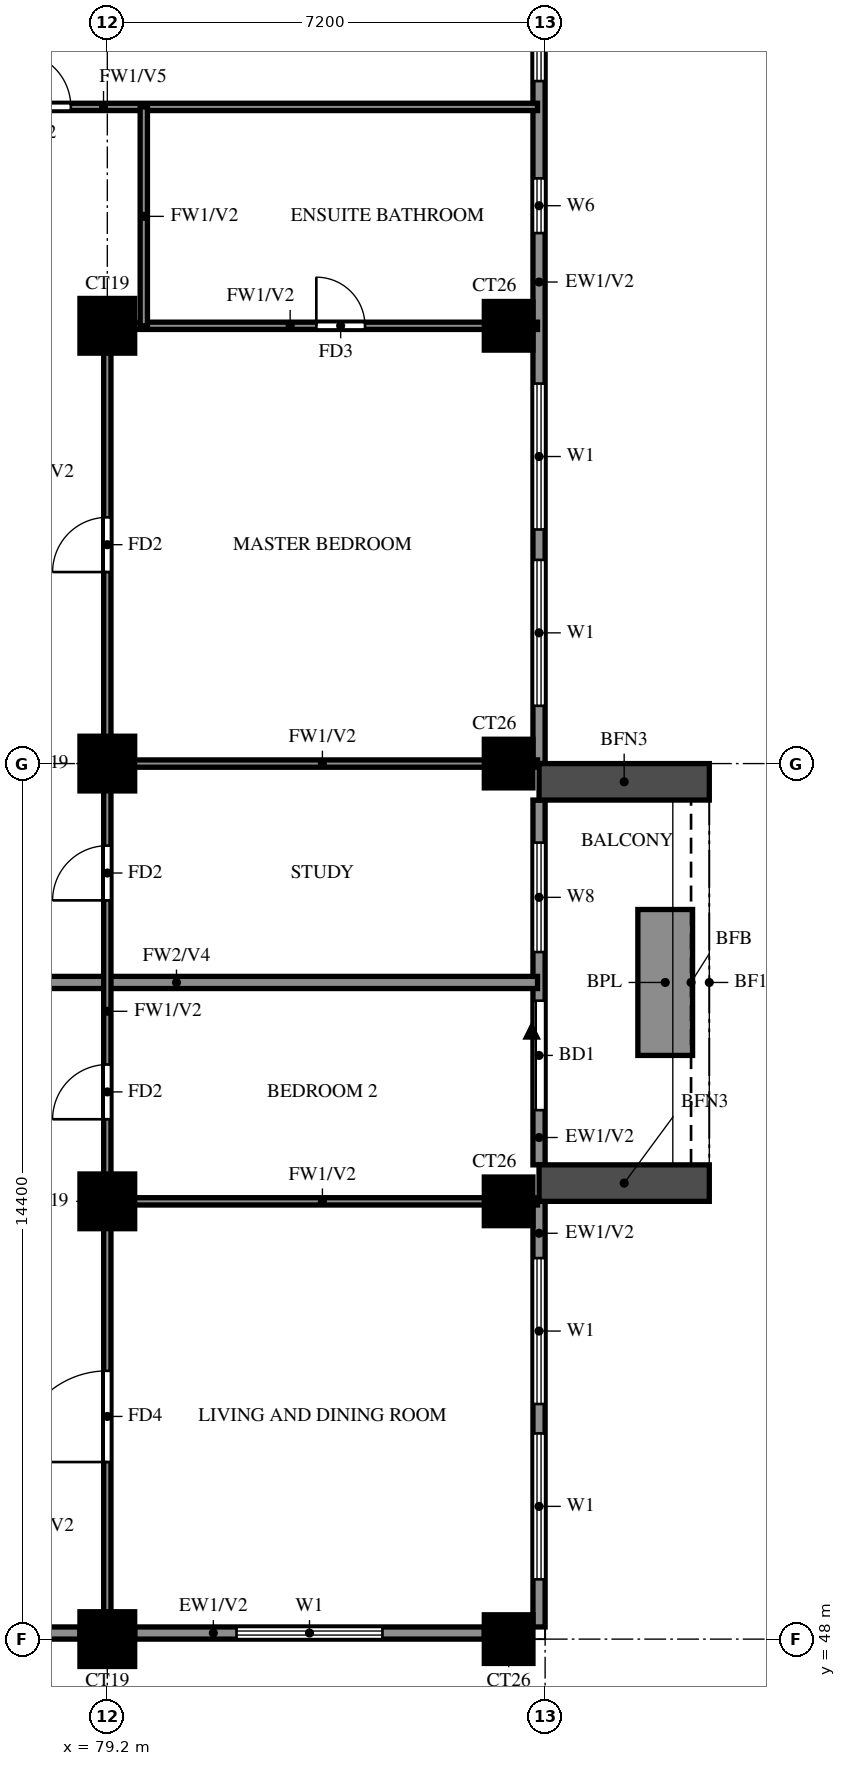
"""IFC4 building model, lengths in metres.
Left out: names, types, materials, properties, quantities, classifications, styles, units other than length and angle.
Written with IfcOpenShell. Run it as: python <this file> out.ifc"""

import sys

from ifc_helpers import new_model, si_unit, direction, frame, frame_2d, origin, origin_2d, place, context, subcontext, project, spatial, rectangle, extrude, source, transform, mapped, element, fill, save


model = new_model("IFC4")
c1 = context("Model", 3, precision=1e-05, world=origin(), true_north=direction((0.0, 1.0)))
c2 = subcontext(c1, "Body", "Model", "MODEL_VIEW")
j1 = project(units=[si_unit("LENGTHUNIT", "METRE"), si_unit("PLANEANGLEUNIT", "RADIAN")], contexts=[c1])
p1 = place(None, origin())
s1 = spatial("IfcSite", under=j1, at=p1, CompositionType="ELEMENT")
p2 = place(p1, origin())
s2 = spatial("IfcBuilding", under=s1, at=p2, CompositionType="ELEMENT")
p3 = place(p2, frame((0.0, 0.0, 181.5)))
s3 = spatial("IfcBuildingStorey", under=s2, at=p3, CompositionType="ELEMENT", Elevation=181.5)
m1 = source(origin(), c2, "Body", "SweptSolid", [
    extrude(rectangle(XDim=0.9, YDim=0.9, at=origin_2d()), origin(), (0.0, 0.0, 1.0), 3.2),
])
p4 = place(p3, frame((79.2, 48.0, 0.0), z_axis=(0.0, 0.0, 1.0), x_axis=(1.0, 0.0, 0.0)))
e1 = element("IfcColumn", 1, at=p4, inside=s3, PredefinedType="COLUMN", context=c2, shape_type="MappedRepresentation", body=[
    mapped(m1, transform((0.0, 0.0, 0.0))),
])
m2 = source(origin(), c2, "Body", "SweptSolid", [
    extrude(rectangle(XDim=0.8, YDim=0.8, at=origin_2d()), origin(), (0.0, 0.0, 1.0), 3.2),
])
p5 = place(p3, frame((85.8, 48.0, 0.0), z_axis=(0.0, 0.0, 1.0), x_axis=(1.0, 0.0, 0.0)))
e2 = element("IfcColumn", 2, at=p5, inside=s3, PredefinedType="COLUMN", context=c2, shape_type="MappedRepresentation", body=[
    mapped(m2, transform((0.0, 0.0, 0.0))),
])
p6 = place(p3, frame((79.2, 55.2, 0.0), z_axis=(0.0, 0.0, 1.0), x_axis=(1.0, 0.0, 0.0)))
e3 = element("IfcColumn", 3, at=p6, inside=s3, PredefinedType="COLUMN", context=c2, shape_type="MappedRepresentation", body=[
    mapped(m1, transform((0.0, 0.0, 0.0))),
])
p7 = place(p3, frame((85.8, 55.2, 0.0), z_axis=(0.0, 0.0, 1.0), x_axis=(1.0, 0.0, 0.0)))
e4 = element("IfcColumn", 4, at=p7, inside=s3, PredefinedType="COLUMN", context=c2, shape_type="MappedRepresentation", body=[
    mapped(m2, transform((0.0, 0.0, 0.0))),
])
p8 = place(p3, frame((79.2, 62.4, 0.0), z_axis=(0.0, 0.0, 1.0), x_axis=(1.0, 0.0, 0.0)))
e5 = element("IfcColumn", 5, at=p8, inside=s3, PredefinedType="COLUMN", context=c2, shape_type="MappedRepresentation", body=[
    mapped(m1, transform((0.0, 0.0, 0.0))),
])
p9 = place(p3, frame((85.8, 62.4, 0.0), z_axis=(0.0, 0.0, 1.0), x_axis=(1.0, 0.0, 0.0)))
e6 = element("IfcColumn", 6, at=p9, inside=s3, PredefinedType="COLUMN", context=c2, shape_type="MappedRepresentation", body=[
    mapped(m2, transform((0.0, 0.0, 0.0))),
])
p10 = place(p3, frame((79.2, 69.6, 0.0), z_axis=(0.0, 0.0, 1.0), x_axis=(1.0, 0.0, 0.0)))
e7 = element("IfcColumn", 7, at=p10, inside=s3, PredefinedType="COLUMN", context=c2, shape_type="MappedRepresentation", body=[
    mapped(m1, transform((0.0, 0.0, 0.0))),
])
p11 = place(p3, frame((85.8, 69.6, 0.0), z_axis=(0.0, 0.0, 1.0), x_axis=(1.0, 0.0, 0.0)))
e8 = element("IfcColumn", 8, at=p11, inside=s3, PredefinedType="COLUMN", context=c2, shape_type="MappedRepresentation", body=[
    mapped(m2, transform((0.0, 0.0, 0.0))),
])
p12 = place(p3, frame((85.719, 39.881, 0.0), z_axis=(0.0, 0.0, 1.0), x_axis=(-0.86377618652, 0.503875678716, 0.0)))
e9 = element("IfcWall", 9, at=p12, inside=s3, PredefinedType="SOLIDWALL", context=c2, shape_type="SweptSolid", body=[
    extrude(rectangle(XDim=16.311, YDim=0.2, at=frame_2d((8.156, 0.0))), origin(), (0.0, 0.0, 1.0), 3.2),
])
p13 = place(p12, frame((13.326, 0.0, 1.5)))
e10 = element("IfcOpeningElement", 10, at=p13, cuts=e9, PredefinedType="OPENING", context=c2, shape_type="SweptSolid", body=[
    extrude(rectangle(XDim=0.9, YDim=0.9, at=frame_2d((0.45, 0.45))), frame((0.0, 0.11, 0.0), z_axis=(0.0, -1.0, 0.0), x_axis=(1.0, 0.0, 0.0)), (0.0, 0.0, 1.0), 0.22),
])
p14 = place(p3, frame((71.99, 48.1, 0.0), z_axis=(0.0, 0.0, 1.0), x_axis=(1.0, 0.0, 0.0)))
e11 = element("IfcWall", 11, at=p14, inside=s3, PredefinedType="SOLIDWALL", context=c2, shape_type="SweptSolid", body=[
    extrude(rectangle(XDim=6.76, YDim=0.2, at=frame_2d((3.38, 0.0))), origin(), (0.0, 0.0, 1.0), 3.2),
])
p15 = place(p14, frame((2.205, 0.0, 1.5)))
e12 = element("IfcOpeningElement", 12, at=p15, cuts=e11, PredefinedType="OPENING", context=c2, shape_type="SweptSolid", body=[
    extrude(rectangle(XDim=0.9, YDim=0.9, at=frame_2d((0.45, 0.45))), frame((0.0, 0.11, 0.0), z_axis=(0.0, -1.0, 0.0), x_axis=(1.0, 0.0, 0.0)), (0.0, 0.0, 1.0), 0.22),
])
p16 = place(p3, frame((79.65, 48.1, 0.0), z_axis=(0.0, 0.0, 1.0), x_axis=(1.0, 0.0, 0.0)))
e13 = element("IfcWall", 13, at=p16, inside=s3, PredefinedType="SOLIDWALL", context=c2, shape_type="SweptSolid", body=[
    extrude(rectangle(XDim=5.75, YDim=0.2, at=frame_2d((2.875, 0.0))), origin(), (0.0, 0.0, 1.0), 3.2),
])
p17 = place(p16, frame((1.675, 0.0, 0.6)))
e14 = element("IfcOpeningElement", 14, at=p17, cuts=e13, PredefinedType="OPENING", context=c2, shape_type="SweptSolid", body=[
    extrude(rectangle(XDim=2.4, YDim=2.4, at=frame_2d((1.2, 1.2))), frame((0.0, 0.11, 0.0), z_axis=(0.0, -1.0, 0.0), x_axis=(1.0, 0.0, 0.0)), (0.0, 0.0, 1.0), 0.22),
])
p18 = place(p3, frame((86.3, 48.2, 0.0), z_axis=(0.0, 0.0, 1.0), x_axis=(0.0, 1.0, 0.0)))
e15 = element("IfcWall", 15, at=p18, inside=s3, PredefinedType="SOLIDWALL", context=c2, shape_type="SweptSolid", body=[
    extrude(rectangle(XDim=7.0, YDim=0.2, at=frame_2d((3.5, 0.0))), origin(), (0.0, 0.0, 1.0), 3.2),
])
p19 = place(p18, frame((0.783, 0.0, 0.6)))
e16 = element("IfcOpeningElement", 16, at=p19, cuts=e15, PredefinedType="OPENING", context=c2, shape_type="SweptSolid", body=[
    extrude(rectangle(XDim=2.4, YDim=2.4, at=frame_2d((1.2, 1.2))), frame((0.0, 0.11, 0.0), z_axis=(0.0, -1.0, 0.0), x_axis=(1.0, 0.0, 0.0)), (0.0, 0.0, 1.0), 0.22),
])
p20 = place(p18, frame((3.667, 0.0, 0.6)))
e17 = element("IfcOpeningElement", 17, at=p20, cuts=e15, PredefinedType="OPENING", context=c2, shape_type="SweptSolid", body=[
    extrude(rectangle(XDim=2.4, YDim=2.4, at=frame_2d((1.2, 1.2))), frame((0.0, 0.11, 0.0), z_axis=(0.0, -1.0, 0.0), x_axis=(1.0, 0.0, 0.0)), (0.0, 0.0, 1.0), 0.22),
])
p21 = place(p3, frame((86.3, 55.8, 0.0), z_axis=(0.0, 0.0, 1.0), x_axis=(0.0, 1.0, 0.0)))
e18 = element("IfcWall", 18, at=p21, inside=s3, PredefinedType="SOLIDWALL", context=c2, shape_type="SweptSolid", body=[
    extrude(rectangle(XDim=6.0, YDim=0.2, at=frame_2d((3.0, 0.0))), origin(), (0.0, 0.0, 1.0), 3.2),
])
p22 = place(p21, frame((0.9, 0.0, 0.0)))
e19 = element("IfcOpeningElement", 19, at=p22, cuts=e18, PredefinedType="OPENING", context=c2, shape_type="SweptSolid", body=[
    extrude(rectangle(XDim=1.8, YDim=2.4, at=frame_2d((0.9, 1.2))), frame((0.0, 0.11, 0.0), z_axis=(0.0, -1.0, 0.0), x_axis=(1.0, 0.0, 0.0)), (0.0, 0.0, 1.0), 0.22),
])
p23 = place(p21, frame((3.5, 0.0, 0.6)))
e20 = element("IfcOpeningElement", 20, at=p23, cuts=e18, PredefinedType="OPENING", context=c2, shape_type="SweptSolid", body=[
    extrude(rectangle(XDim=1.8, YDim=2.4, at=frame_2d((0.9, 1.2))), frame((0.0, 0.11, 0.0), z_axis=(0.0, -1.0, 0.0), x_axis=(1.0, 0.0, 0.0)), (0.0, 0.0, 1.0), 0.22),
])
p24 = place(p3, frame((86.3, 62.4, 0.0), z_axis=(0.0, 0.0, 1.0), x_axis=(0.0, 1.0, 0.0)))
e21 = element("IfcWall", 21, at=p24, inside=s3, PredefinedType="SOLIDWALL", context=c2, shape_type="SweptSolid", body=[
    extrude(rectangle(XDim=14.4, YDim=0.2, at=frame_2d((7.2, 0.0))), origin(), (0.0, 0.0, 1.0), 3.2),
])
p25 = place(p24, frame((0.95, 0.0, 0.6)))
e22 = element("IfcOpeningElement", 22, at=p25, cuts=e21, PredefinedType="OPENING", context=c2, shape_type="SweptSolid", body=[
    extrude(rectangle(XDim=2.4, YDim=2.4, at=frame_2d((1.2, 1.2))), frame((0.0, 0.11, 0.0), z_axis=(0.0, -1.0, 0.0), x_axis=(1.0, 0.0, 0.0)), (0.0, 0.0, 1.0), 0.22),
])
p26 = place(p24, frame((3.85, 0.0, 0.6)))
e23 = element("IfcOpeningElement", 23, at=p26, cuts=e21, PredefinedType="OPENING", context=c2, shape_type="SweptSolid", body=[
    extrude(rectangle(XDim=2.4, YDim=2.4, at=frame_2d((1.2, 1.2))), frame((0.0, 0.11, 0.0), z_axis=(0.0, -1.0, 0.0), x_axis=(1.0, 0.0, 0.0)), (0.0, 0.0, 1.0), 0.22),
])
p27 = place(p24, frame((8.725, 0.0, 1.5)))
e24 = element("IfcOpeningElement", 24, at=p27, cuts=e21, PredefinedType="OPENING", context=c2, shape_type="SweptSolid", body=[
    extrude(rectangle(XDim=0.9, YDim=0.9, at=frame_2d((0.45, 0.45))), frame((0.0, 0.11, 0.0), z_axis=(0.0, -1.0, 0.0), x_axis=(1.0, 0.0, 0.0)), (0.0, 0.0, 1.0), 0.22),
])
p28 = place(p24, frame((11.225, 0.0, 0.6)))
e25 = element("IfcOpeningElement", 25, at=p28, cuts=e21, PredefinedType="OPENING", context=c2, shape_type="SweptSolid", body=[
    extrude(rectangle(XDim=2.4, YDim=2.4, at=frame_2d((1.2, 1.2))), frame((0.0, 0.11, 0.0), z_axis=(0.0, -1.0, 0.0), x_axis=(1.0, 0.0, 0.0)), (0.0, 0.0, 1.0), 0.22),
])
for number, where, z_axis, x_axis in (
    (26, (86.3, 55.5, 0.0), (0.0, 0.0, 1.0), (1.0, 0.0, 0.0)),
    (27, (86.3, 62.1, 0.0), (0.0, 0.0, 1.0), (1.0, 0.0, 0.0)),
):
    element("IfcWall", number, at=place(p3, frame(where, z_axis=z_axis, x_axis=x_axis)), inside=s3, PredefinedType="SOLIDWALL", context=c2, shape_type="SweptSolid", body=[
        extrude(rectangle(XDim=2.8, YDim=0.6, at=frame_2d((1.4, 0.0))), origin(), (0.0, 0.0, 1.0), 2.85),
    ])
p29 = place(p3, frame((88.375, 57.6, 0.0), z_axis=(0.0, 0.0, 1.0), x_axis=(0.0, 1.0, 0.0)))
e28 = element("IfcWall", 28, at=p29, inside=s3, PredefinedType="SOLIDWALL", context=c2, shape_type="SweptSolid", body=[
    extrude(rectangle(XDim=2.4, YDim=0.9, at=frame_2d((1.2, 0.0))), origin(), (0.0, 0.0, 1.0), 0.9),
])
p30 = place(p3, frame((74.4, 58.8, 0.0), z_axis=(0.0, 0.0, 1.0), x_axis=(1.0, 0.0, 0.0)))
e29 = element("IfcWall", 29, at=p30, inside=s3, PredefinedType="SOLIDWALL", context=c2, shape_type="SweptSolid", body=[
    extrude(rectangle(XDim=11.875, YDim=0.2, at=frame_2d((5.938, 0.0))), origin(), (0.0, 0.0, 1.0), 2.3),
])
for number, where, z_axis, x_axis in (
    (30, (79.2, 55.2, 0.0), (0.0, 0.0, 1.0), (1.0, 0.0, 0.0)),
    (31, (79.2, 62.4, 0.0), (0.0, 0.0, 1.0), (1.0, 0.0, 0.0)),
):
    element("IfcWall", number, at=place(p3, frame(where, z_axis=z_axis, x_axis=x_axis)), inside=s3, PredefinedType="PARTITIONING", context=c2, shape_type="SweptSolid", body=[
        extrude(rectangle(XDim=7.075, YDim=0.12, at=frame_2d((3.538, 0.0))), origin(), (0.0, 0.0, 1.0), 3.2),
    ])
p31 = place(p3, frame((79.2, 69.6, 0.0), z_axis=(0.0, 0.0, 1.0), x_axis=(1.0, 0.0, 0.0)))
e32 = element("IfcWall", 32, at=p31, inside=s3, PredefinedType="PARTITIONING", context=c2, shape_type="SweptSolid", body=[
    extrude(rectangle(XDim=7.075, YDim=0.12, at=frame_2d((3.538, 0.0))), origin(), (0.0, 0.0, 1.0), 3.2),
])
p32 = place(p31, frame((3.438, 0.0, 0.0)))
e33 = element("IfcOpeningElement", 33, at=p32, cuts=e32, PredefinedType="OPENING", context=c2, shape_type="SweptSolid", body=[
    extrude(rectangle(XDim=0.8, YDim=2.1, at=frame_2d((0.4, 1.05))), frame((0.0, 0.07, 0.0), z_axis=(0.0, -1.0, 0.0), x_axis=(1.0, 0.0, 0.0)), (0.0, 0.0, 1.0), 0.14),
])
p33 = place(p3, frame((72.0, 73.2, 0.0), z_axis=(0.0, 0.0, 1.0), x_axis=(1.0, 0.0, 0.0)))
e34 = element("IfcWall", 34, at=p33, inside=s3, PredefinedType="PARTITIONING", context=c2, shape_type="SweptSolid", body=[
    extrude(rectangle(XDim=14.275, YDim=0.12, at=frame_2d((7.137, 0.0))), origin(), (0.0, 0.0, 1.0), 2.3),
])
p34 = place(p33, frame((5.7, 0.0, 0.0)))
e35 = element("IfcOpeningElement", 35, at=p34, cuts=e34, PredefinedType="OPENING", context=c2, shape_type="SweptSolid", body=[
    extrude(rectangle(XDim=0.9, YDim=2.1, at=frame_2d((0.45, 1.05))), frame((0.0, 0.07, 0.0), z_axis=(0.0, -1.0, 0.0), x_axis=(1.0, 0.0, 0.0)), (0.0, 0.0, 1.0), 0.14),
])
p35 = place(p3, frame((79.2, 48.125, 0.0), z_axis=(0.0, 0.0, 1.0), x_axis=(0.0, 1.0, 0.0)))
e36 = element("IfcWall", 36, at=p35, inside=s3, PredefinedType="PARTITIONING", context=c2, shape_type="SweptSolid", body=[
    extrude(rectangle(XDim=21.475, YDim=0.12, at=frame_2d((10.738, 0.0))), origin(), (0.0, 0.0, 1.0), 3.2),
])
p36 = place(p35, frame((2.788, 0.0, 0.0)))
e37 = element("IfcOpeningElement", 37, at=p36, cuts=e36, PredefinedType="OPENING", context=c2, shape_type="SweptSolid", body=[
    extrude(rectangle(XDim=1.5, YDim=2.1, at=frame_2d((0.75, 1.05))), frame((0.0, 0.07, 0.0), z_axis=(0.0, -1.0, 0.0), x_axis=(1.0, 0.0, 0.0)), (0.0, 0.0, 1.0), 0.14),
])
p37 = place(p35, frame((8.425, 0.0, 0.0)))
e38 = element("IfcOpeningElement", 38, at=p37, cuts=e36, PredefinedType="OPENING", context=c2, shape_type="SweptSolid", body=[
    extrude(rectangle(XDim=0.9, YDim=2.1, at=frame_2d((0.45, 1.05))), frame((0.0, 0.07, 0.0), z_axis=(0.0, -1.0, 0.0), x_axis=(1.0, 0.0, 0.0)), (0.0, 0.0, 1.0), 0.14),
])
p38 = place(p35, frame((12.025, 0.0, 0.0)))
e39 = element("IfcOpeningElement", 39, at=p38, cuts=e36, PredefinedType="OPENING", context=c2, shape_type="SweptSolid", body=[
    extrude(rectangle(XDim=0.9, YDim=2.1, at=frame_2d((0.45, 1.05))), frame((0.0, 0.07, 0.0), z_axis=(0.0, -1.0, 0.0), x_axis=(1.0, 0.0, 0.0)), (0.0, 0.0, 1.0), 0.14),
])
p39 = place(p35, frame((17.425, 0.0, 0.0)))
e40 = element("IfcOpeningElement", 40, at=p39, cuts=e36, PredefinedType="OPENING", context=c2, shape_type="SweptSolid", body=[
    extrude(rectangle(XDim=0.9, YDim=2.1, at=frame_2d((0.45, 1.05))), frame((0.0, 0.07, 0.0), z_axis=(0.0, -1.0, 0.0), x_axis=(1.0, 0.0, 0.0)), (0.0, 0.0, 1.0), 0.14),
])
p40 = place(p3, frame((79.8, 69.6, 0.0), z_axis=(0.0, 0.0, 1.0), x_axis=(0.0, 1.0, 0.0)))
e41 = element("IfcWall", 41, at=p40, inside=s3, PredefinedType="PARTITIONING", context=c2, shape_type="SweptSolid", body=[
    extrude(rectangle(XDim=3.6, YDim=0.12, at=frame_2d((1.8, 0.0))), origin(), (0.0, 0.0, 1.0), 3.2),
])
p41 = place(p17, origin())
e42 = element("IfcWindow", 42, at=p41, inside=s3, PartitioningType="DOUBLE_PANEL_VERTICAL", PredefinedType="WINDOW", context=c2, shape_type="SweptSolid", body=[
    extrude(rectangle(XDim=2.4, YDim=2.4, at=frame_2d((1.2, 1.2))), frame((0.0, 0.03, 0.0), z_axis=(0.0, -1.0, 0.0), x_axis=(1.0, 0.0, 0.0)), (0.0, 0.0, 1.0), 0.06),
])
fill(e14, e42)
p42 = place(p19, origin())
e43 = element("IfcWindow", 43, at=p42, inside=s3, PartitioningType="DOUBLE_PANEL_VERTICAL", PredefinedType="WINDOW", context=c2, shape_type="SweptSolid", body=[
    extrude(rectangle(XDim=2.4, YDim=2.4, at=frame_2d((1.2, 1.2))), frame((0.0, 0.03, 0.0), z_axis=(0.0, -1.0, 0.0), x_axis=(1.0, 0.0, 0.0)), (0.0, 0.0, 1.0), 0.06),
])
fill(e16, e43)
p43 = place(p20, origin())
e44 = element("IfcWindow", 44, at=p43, inside=s3, PartitioningType="DOUBLE_PANEL_VERTICAL", PredefinedType="WINDOW", context=c2, shape_type="SweptSolid", body=[
    extrude(rectangle(XDim=2.4, YDim=2.4, at=frame_2d((1.2, 1.2))), frame((0.0, 0.03, 0.0), z_axis=(0.0, -1.0, 0.0), x_axis=(1.0, 0.0, 0.0)), (0.0, 0.0, 1.0), 0.06),
])
fill(e17, e44)
p44 = place(p22, origin())
e45 = element("IfcDoor", 45, at=p44, inside=s3, OperationType="DOUBLE_DOOR_SLIDING", PredefinedType="DOOR", context=c2, shape_type="SweptSolid", body=[
    extrude(rectangle(XDim=1.8, YDim=2.4, at=frame_2d((0.9, 1.2))), frame((0.0, 0.025, 0.0), z_axis=(0.0, -1.0, 0.0), x_axis=(1.0, 0.0, 0.0)), (0.0, 0.0, 1.0), 0.05),
])
fill(e19, e45)
p45 = place(p23, origin())
e46 = element("IfcWindow", 46, at=p45, inside=s3, PartitioningType="DOUBLE_PANEL_VERTICAL", PredefinedType="WINDOW", context=c2, shape_type="SweptSolid", body=[
    extrude(rectangle(XDim=1.8, YDim=2.4, at=frame_2d((0.9, 1.2))), frame((0.0, 0.03, 0.0), z_axis=(0.0, -1.0, 0.0), x_axis=(1.0, 0.0, 0.0)), (0.0, 0.0, 1.0), 0.06),
])
fill(e20, e46)
p46 = place(p25, origin())
e47 = element("IfcWindow", 47, at=p46, inside=s3, PartitioningType="DOUBLE_PANEL_VERTICAL", PredefinedType="WINDOW", context=c2, shape_type="SweptSolid", body=[
    extrude(rectangle(XDim=2.4, YDim=2.4, at=frame_2d((1.2, 1.2))), frame((0.0, 0.03, 0.0), z_axis=(0.0, -1.0, 0.0), x_axis=(1.0, 0.0, 0.0)), (0.0, 0.0, 1.0), 0.06),
])
fill(e22, e47)
p47 = place(p26, origin())
e48 = element("IfcWindow", 48, at=p47, inside=s3, PartitioningType="DOUBLE_PANEL_VERTICAL", PredefinedType="WINDOW", context=c2, shape_type="SweptSolid", body=[
    extrude(rectangle(XDim=2.4, YDim=2.4, at=frame_2d((1.2, 1.2))), frame((0.0, 0.03, 0.0), z_axis=(0.0, -1.0, 0.0), x_axis=(1.0, 0.0, 0.0)), (0.0, 0.0, 1.0), 0.06),
])
fill(e23, e48)
p48 = place(p27, origin())
e49 = element("IfcWindow", 49, at=p48, inside=s3, PartitioningType="SINGLE_PANEL", PredefinedType="WINDOW", context=c2, shape_type="SweptSolid", body=[
    extrude(rectangle(XDim=0.9, YDim=0.9, at=frame_2d((0.45, 0.45))), frame((0.0, 0.03, 0.0), z_axis=(0.0, -1.0, 0.0), x_axis=(1.0, 0.0, 0.0)), (0.0, 0.0, 1.0), 0.06),
])
fill(e24, e49)
p49 = place(p28, origin())
e50 = element("IfcWindow", 50, at=p49, inside=s3, PartitioningType="DOUBLE_PANEL_VERTICAL", PredefinedType="WINDOW", context=c2, shape_type="SweptSolid", body=[
    extrude(rectangle(XDim=2.4, YDim=2.4, at=frame_2d((1.2, 1.2))), frame((0.0, 0.03, 0.0), z_axis=(0.0, -1.0, 0.0), x_axis=(1.0, 0.0, 0.0)), (0.0, 0.0, 1.0), 0.06),
])
fill(e25, e50)
p50 = place(p36, origin())
e51 = element("IfcDoor", 51, at=p50, inside=s3, OperationType="SINGLE_SWING_LEFT", PredefinedType="DOOR", context=c2, shape_type="SweptSolid", body=[
    extrude(rectangle(XDim=1.5, YDim=2.1, at=frame_2d((0.75, 1.05))), frame((0.0, 0.025, 0.0), z_axis=(0.0, -1.0, 0.0), x_axis=(1.0, 0.0, 0.0)), (0.0, 0.0, 1.0), 0.05),
])
fill(e37, e51)
p51 = place(p37, origin())
e52 = element("IfcDoor", 52, at=p51, inside=s3, OperationType="SINGLE_SWING_RIGHT", PredefinedType="DOOR", context=c2, shape_type="SweptSolid", body=[
    extrude(rectangle(XDim=0.9, YDim=2.1, at=frame_2d((0.45, 1.05))), frame((0.0, 0.025, 0.0), z_axis=(0.0, -1.0, 0.0), x_axis=(1.0, 0.0, 0.0)), (0.0, 0.0, 1.0), 0.05),
])
fill(e38, e52)
p52 = place(p38, origin())
e53 = element("IfcDoor", 53, at=p52, inside=s3, OperationType="SINGLE_SWING_LEFT", PredefinedType="DOOR", context=c2, shape_type="SweptSolid", body=[
    extrude(rectangle(XDim=0.9, YDim=2.1, at=frame_2d((0.45, 1.05))), frame((0.0, 0.025, 0.0), z_axis=(0.0, -1.0, 0.0), x_axis=(1.0, 0.0, 0.0)), (0.0, 0.0, 1.0), 0.05),
])
fill(e39, e53)
p53 = place(p39, origin())
e54 = element("IfcDoor", 54, at=p53, inside=s3, OperationType="SINGLE_SWING_LEFT", PredefinedType="DOOR", context=c2, shape_type="SweptSolid", body=[
    extrude(rectangle(XDim=0.9, YDim=2.1, at=frame_2d((0.45, 1.05))), frame((0.0, 0.025, 0.0), z_axis=(0.0, -1.0, 0.0), x_axis=(1.0, 0.0, 0.0)), (0.0, 0.0, 1.0), 0.05),
])
fill(e40, e54)
p54 = place(p32, origin())
e55 = element("IfcDoor", 55, at=p54, inside=s3, OperationType="SINGLE_SWING_RIGHT", PredefinedType="DOOR", context=c2, shape_type="SweptSolid", body=[
    extrude(rectangle(XDim=0.8, YDim=2.1, at=frame_2d((0.4, 1.05))), frame((0.0, 0.025, 0.0), z_axis=(0.0, -1.0, 0.0), x_axis=(1.0, 0.0, 0.0)), (0.0, 0.0, 1.0), 0.05),
])
fill(e33, e55)
p55 = place(p34, origin())
e56 = element("IfcDoor", 56, at=p55, inside=s3, OperationType="SINGLE_SWING_LEFT", PredefinedType="DOOR", context=c2, shape_type="SweptSolid", body=[
    extrude(rectangle(XDim=0.9, YDim=2.1, at=frame_2d((0.45, 1.05))), frame((0.0, 0.025, 0.0), z_axis=(0.0, -1.0, 0.0), x_axis=(1.0, 0.0, 0.0)), (0.0, 0.0, 1.0), 0.05),
])
fill(e35, e56)
save(model, sys.argv[1])
